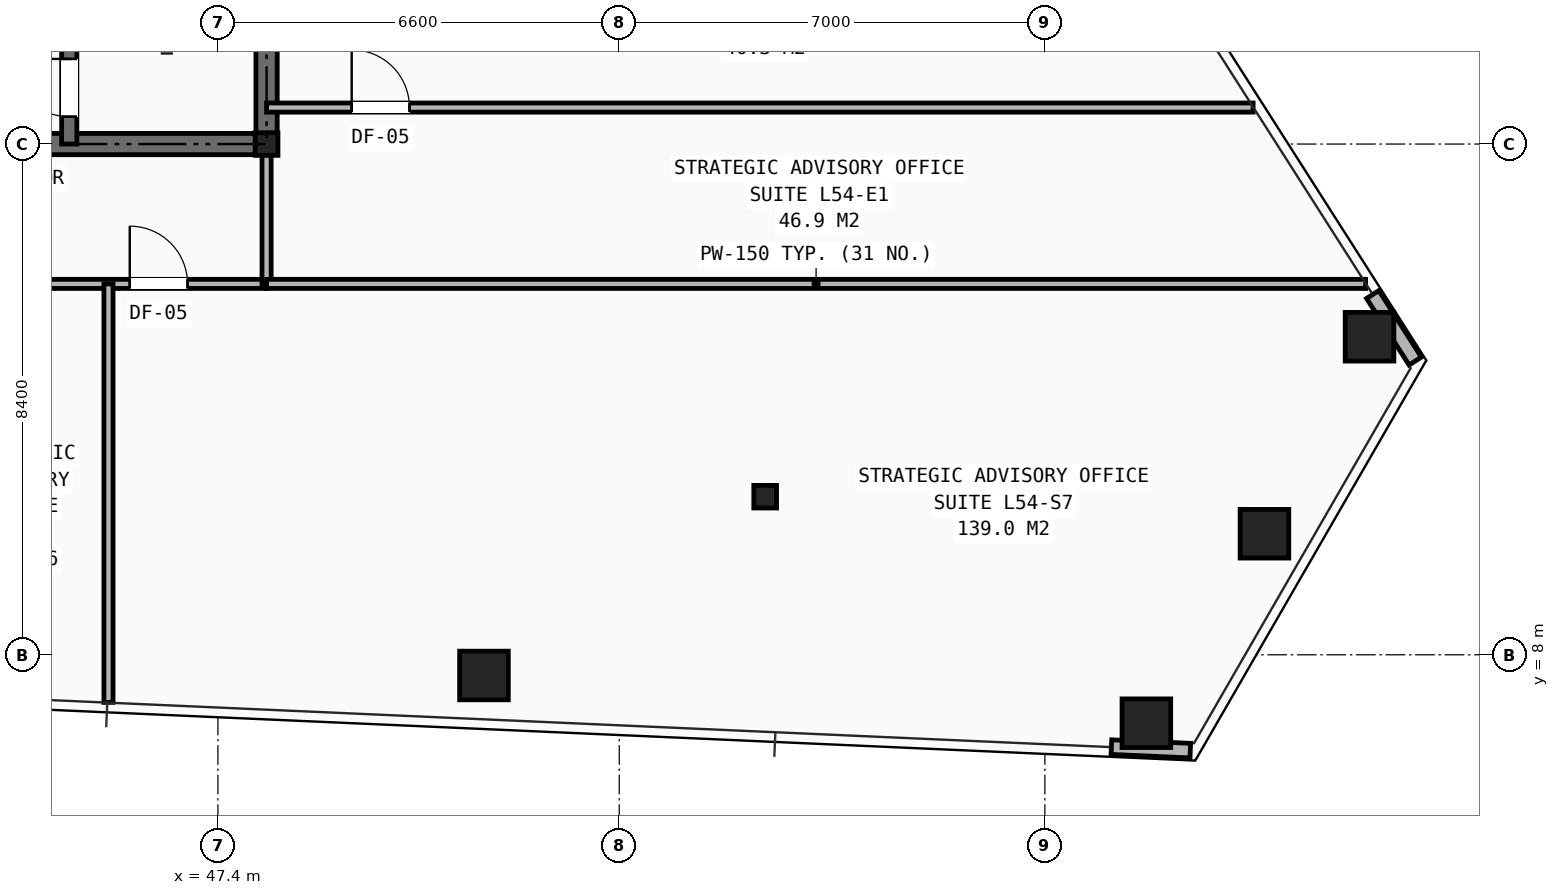
"""IFC4 building model, lengths in metres.
Left out: names, types, materials, properties, quantities, classifications, styles, units other than length and angle.
Written with IfcOpenShell. Run it as: python <this file> out.ifc"""

import sys

from ifc_helpers import new_model, si_unit, direction, frame, frame_2d, origin, origin_2d, place, context, subcontext, project, spatial, rectangle, hollow_rectangle, i_section, extrude, element, fill, save


model = new_model("IFC4")
c1 = context("Model", 3, precision=1e-05, world=origin(), true_north=direction((0.0, 1.0)))
c2 = subcontext(c1, "Body", "Model", "MODEL_VIEW")
j1 = project(units=[si_unit("LENGTHUNIT", "METRE"), si_unit("PLANEANGLEUNIT", "RADIAN")], contexts=[c1])
p1 = place(None, origin())
s1 = spatial("IfcSite", under=j1, at=p1, CompositionType="ELEMENT")
p2 = place(p1, origin())
s2 = spatial("IfcBuilding", under=s1, at=p2, CompositionType="ELEMENT")
p3 = place(p2, frame((0.0, 0.0, 189.6)))
s3 = spatial("IfcBuildingStorey", under=s2, at=p3, CompositionType="ELEMENT", Elevation=189.6)
for number, where, z_axis, x_axis in (
    (1, (48.2, 16.4, 0.0), (0.0, 0.0, 1.0), (1.0, 0.0, 0.0)),
    (2, (56.4, 10.6, 0.0), (0.0, 0.0, 1.0), (1.0, 0.0, 0.0)),
):
    element("IfcColumn", number, at=place(p3, frame(where, z_axis=z_axis, x_axis=x_axis)), inside=s3, PredefinedType="COLUMN", context=c2, shape_type="SweptSolid", body=[
        extrude(i_section(OverallWidth=0.374, OverallDepth=0.372, WebThickness=0.016, FlangeThickness=0.026, at=origin_2d()), origin(), (0.0, 0.0, 1.0), 3.45),
    ])
for number, where, z_axis, x_axis in (
    (3, (51.775, 7.659, 0.0), (0.0, 0.0, 1.0), (1.0, 0.0, 0.0)),
    (4, (62.669, 6.875, 0.0), (0.0, 0.0, 1.0), (1.0, 0.0, 0.0)),
    (5, (64.611, 9.991, 0.0), (0.0, 0.0, 1.0), (1.0, 0.0, 0.0)),
    (6, (66.339, 13.231, 0.0), (0.0, 0.0, 1.0), (1.0, 0.0, 0.0)),
):
    element("IfcColumn", number, at=place(p3, frame(where, z_axis=z_axis, x_axis=x_axis)), inside=s3, PredefinedType="COLUMN", context=c2, shape_type="SweptSolid", body=[
        extrude(hollow_rectangle(XDim=0.8, YDim=0.8, WallThickness=0.055, at=origin_2d()), origin(), (0.0, 0.0, 1.0), 3.45),
    ])
for number, where, z_axis, x_axis in (
    (7, (62.094, 6.481, 0.0), (0.0, 0.0, 1.0), (0.999, -0.044, 0.0)),
    (8, (67.09, 12.831, 0.0), (0.0, 0.0, 1.0), (-0.538, 0.843, 0.0)),
):
    element("IfcWall", number, at=place(p3, frame(where, z_axis=z_axis, x_axis=x_axis)), inside=s3, PredefinedType="SHEAR", context=c2, shape_type="SweptSolid", body=[
        extrude(rectangle(XDim=1.298, YDim=0.24, at=frame_2d((0.649, 0.0))), origin(), (0.0, 0.0, 1.0), 2.583),
    ])
p4 = place(p3, frame((31.8, 16.4, 0.0), z_axis=(0.0, 0.0, 1.0), x_axis=(1.0, 0.0, 0.0)))
e9 = element("IfcWall", 9, at=p4, inside=s3, PredefinedType="SHEAR", context=c2, shape_type="SweptSolid", body=[
    extrude(rectangle(XDim=16.4, YDim=0.35, at=frame_2d((8.2, 0.0))), origin(), (0.0, 0.0, 1.0), 3.21),
])
p5 = place(p4, frame((7.75, 0.0, 0.0)))
e10 = element("IfcOpeningElement", 10, at=p5, cuts=e9, PredefinedType="OPENING", context=c2, shape_type="SweptSolid", body=[
    extrude(rectangle(XDim=0.9, YDim=2.1, at=frame_2d((0.45, 1.05))), frame((0.0, 0.185, 0.0), z_axis=(0.0, -1.0, 0.0), x_axis=(1.0, 0.0, 0.0)), (0.0, 0.0, 1.0), 0.37),
])
p6 = place(p4, frame((4.2, 0.0, 0.0)))
e11 = element("IfcOpeningElement", 11, at=p6, cuts=e9, PredefinedType="OPENING", context=c2, shape_type="SweptSolid", body=[
    extrude(rectangle(XDim=0.95, YDim=2.1, at=frame_2d((0.475, 1.05))), frame((0.0, 0.185, 0.0), z_axis=(0.0, -1.0, 0.0), x_axis=(1.0, 0.0, 0.0)), (0.0, 0.0, 1.0), 0.37),
])
p7 = place(p4, frame((10.6, 0.0, 0.0)))
e12 = element("IfcOpeningElement", 12, at=p7, cuts=e9, PredefinedType="OPENING", context=c2, shape_type="SweptSolid", body=[
    extrude(rectangle(XDim=0.95, YDim=2.1, at=frame_2d((0.475, 1.05))), frame((0.0, 0.185, 0.0), z_axis=(0.0, -1.0, 0.0), x_axis=(1.0, 0.0, 0.0)), (0.0, 0.0, 1.0), 0.37),
])
p8 = place(p3, frame((48.2, 16.4, 0.0), z_axis=(0.0, 0.0, 1.0), x_axis=(0.0, 1.0, 0.0)))
e13 = element("IfcWall", 13, at=p8, inside=s3, PredefinedType="SHEAR", context=c2, shape_type="SweptSolid", body=[
    extrude(rectangle(XDim=14.8, YDim=0.35, at=frame_2d((7.4, 0.0))), origin(), (0.0, 0.0, 1.0), 3.21),
])
p9 = place(p8, frame((11.0, 0.0, 0.0)))
e14 = element("IfcOpeningElement", 14, at=p9, cuts=e13, PredefinedType="OPENING", context=c2, shape_type="SweptSolid", body=[
    extrude(rectangle(XDim=1.1, YDim=2.15, at=frame_2d((0.55, 1.075))), frame((0.0, 0.185, 0.0), z_axis=(0.0, -1.0, 0.0), x_axis=(1.0, 0.0, 0.0)), (0.0, 0.0, 1.0), 0.37),
])
p10 = place(p3, frame((44.955, 16.4, 0.0), z_axis=(0.0, 0.0, 1.0), x_axis=(0.0, 1.0, 0.0)))
e15 = element("IfcWall", 15, at=p10, inside=s3, PredefinedType="SHEAR", context=c2, shape_type="SweptSolid", body=[
    extrude(rectangle(XDim=8.4, YDim=0.25, at=frame_2d((4.2, 0.0))), origin(), (0.0, 0.0, 1.0), 3.21),
])
p11 = place(p10, frame((0.45, 0.0, 0.0)))
e16 = element("IfcOpeningElement", 16, at=p11, cuts=e15, PredefinedType="OPENING", context=c2, shape_type="SweptSolid", body=[
    extrude(rectangle(XDim=0.95, YDim=2.1, at=frame_2d((0.475, 1.05))), frame((0.0, 0.135, 0.0), z_axis=(0.0, -1.0, 0.0), x_axis=(1.0, 0.0, 0.0)), (0.0, 0.0, 1.0), 0.27),
])
p12 = place(p3, frame((29.6, 14.1, 0.0), z_axis=(0.0, 0.0, 1.0), x_axis=(1.0, 0.0, 0.0)))
e17 = element("IfcWall", 17, at=p12, inside=s3, PredefinedType="PARTITIONING", context=c2, shape_type="SweptSolid", body=[
    extrude(rectangle(XDim=18.6, YDim=0.15, at=frame_2d((9.3, 0.0))), origin(), (0.0, 0.0, 1.0), 2.225),
])
p13 = place(p12, frame((0.55, 0.0, 0.0)))
e18 = element("IfcOpeningElement", 18, at=p13, cuts=e17, PredefinedType="OPENING", context=c2, shape_type="SweptSolid", body=[
    extrude(rectangle(XDim=0.95, YDim=2.1, at=frame_2d((0.475, 1.05))), frame((0.0, 0.085, 0.0), z_axis=(0.0, -1.0, 0.0), x_axis=(1.0, 0.0, 0.0)), (0.0, 0.0, 1.0), 0.17),
])
p14 = place(p12, frame((2.35, 0.0, 0.0)))
e19 = element("IfcOpeningElement", 19, at=p14, cuts=e17, PredefinedType="OPENING", context=c2, shape_type="SweptSolid", body=[
    extrude(rectangle(XDim=0.95, YDim=2.1, at=frame_2d((0.475, 1.05))), frame((0.0, 0.085, 0.0), z_axis=(0.0, -1.0, 0.0), x_axis=(1.0, 0.0, 0.0)), (0.0, 0.0, 1.0), 0.17),
])
p15 = place(p12, frame((5.15, 0.0, 0.0)))
e20 = element("IfcOpeningElement", 20, at=p15, cuts=e17, PredefinedType="OPENING", context=c2, shape_type="SweptSolid", body=[
    extrude(rectangle(XDim=0.95, YDim=2.1, at=frame_2d((0.475, 1.05))), frame((0.0, 0.085, 0.0), z_axis=(0.0, -1.0, 0.0), x_axis=(1.0, 0.0, 0.0)), (0.0, 0.0, 1.0), 0.17),
])
p16 = place(p12, frame((7.95, 0.0, 0.0)))
e21 = element("IfcOpeningElement", 21, at=p16, cuts=e17, PredefinedType="OPENING", context=c2, shape_type="SweptSolid", body=[
    extrude(rectangle(XDim=0.95, YDim=2.1, at=frame_2d((0.475, 1.05))), frame((0.0, 0.085, 0.0), z_axis=(0.0, -1.0, 0.0), x_axis=(1.0, 0.0, 0.0)), (0.0, 0.0, 1.0), 0.17),
])
p17 = place(p12, frame((10.75, 0.0, 0.0)))
e22 = element("IfcOpeningElement", 22, at=p17, cuts=e17, PredefinedType="OPENING", context=c2, shape_type="SweptSolid", body=[
    extrude(rectangle(XDim=0.95, YDim=2.1, at=frame_2d((0.475, 1.05))), frame((0.0, 0.085, 0.0), z_axis=(0.0, -1.0, 0.0), x_axis=(1.0, 0.0, 0.0)), (0.0, 0.0, 1.0), 0.17),
])
p18 = place(p12, frame((13.55, 0.0, 0.0)))
e23 = element("IfcOpeningElement", 23, at=p18, cuts=e17, PredefinedType="OPENING", context=c2, shape_type="SweptSolid", body=[
    extrude(rectangle(XDim=0.95, YDim=2.1, at=frame_2d((0.475, 1.05))), frame((0.0, 0.085, 0.0), z_axis=(0.0, -1.0, 0.0), x_axis=(1.0, 0.0, 0.0)), (0.0, 0.0, 1.0), 0.17),
])
p19 = place(p12, frame((16.35, 0.0, 0.0)))
e24 = element("IfcOpeningElement", 24, at=p19, cuts=e17, PredefinedType="OPENING", context=c2, shape_type="SweptSolid", body=[
    extrude(rectangle(XDim=0.95, YDim=2.1, at=frame_2d((0.475, 1.05))), frame((0.0, 0.085, 0.0), z_axis=(0.0, -1.0, 0.0), x_axis=(1.0, 0.0, 0.0)), (0.0, 0.0, 1.0), 0.17),
])
p20 = place(p3, frame((48.2, 14.1, 0.0), z_axis=(0.0, 0.0, 1.0), x_axis=(0.0, 1.0, 0.0)))
e25 = element("IfcWall", 25, at=p20, inside=s3, PredefinedType="PARTITIONING", context=c2, shape_type="SweptSolid", body=[
    extrude(rectangle(XDim=2.3, YDim=0.15, at=frame_2d((1.15, 0.0))), origin(), (0.0, 0.0, 1.0), 2.665),
])
p21 = place(p3, frame((45.6, 7.217, 0.0), z_axis=(0.0, 0.0, 1.0), x_axis=(0.0, 1.0, 0.0)))
e26 = element("IfcWall", 26, at=p21, inside=s3, PredefinedType="PARTITIONING", context=c2, shape_type="SweptSolid", body=[
    extrude(rectangle(XDim=6.883, YDim=0.15, at=frame_2d((3.441, 0.0))), origin(), (0.0, 0.0, 1.0), 2.589),
])
p22 = place(p3, frame((48.2, 14.1, 0.0), z_axis=(0.0, 0.0, 1.0), x_axis=(1.0, 0.0, 0.0)))
e27 = element("IfcWall", 27, at=p22, inside=s3, PredefinedType="PARTITIONING", context=c2, shape_type="SweptSolid", body=[
    extrude(rectangle(XDim=18.074, YDim=0.15, at=frame_2d((9.037, 0.0))), origin(), (0.0, 0.0, 1.0), 2.589),
])
p23 = place(p3, frame((48.2, 17.0, 0.0), z_axis=(0.0, 0.0, 1.0), x_axis=(1.0, 0.0, 0.0)))
e28 = element("IfcWall", 28, at=p23, inside=s3, PredefinedType="PARTITIONING", context=c2, shape_type="SweptSolid", body=[
    extrude(rectangle(XDim=16.224, YDim=0.15, at=frame_2d((8.112, 0.0))), origin(), (0.0, 0.0, 1.0), 2.589),
])
p24 = place(p23, frame((1.4, 0.0, 0.0)))
e29 = element("IfcOpeningElement", 29, at=p24, cuts=e28, PredefinedType="OPENING", context=c2, shape_type="SweptSolid", body=[
    extrude(rectangle(XDim=0.95, YDim=2.1, at=frame_2d((0.475, 1.05))), frame((0.0, 0.085, 0.0), z_axis=(0.0, -1.0, 0.0), x_axis=(1.0, 0.0, 0.0)), (0.0, 0.0, 1.0), 0.17),
])
p25 = place(p11, origin())
e30 = element("IfcDoor", 30, at=p25, inside=s3, OperationType="SINGLE_SWING_RIGHT", PredefinedType="DOOR", context=c2, shape_type="SweptSolid", body=[
    extrude(rectangle(XDim=0.95, YDim=2.1, at=frame_2d((0.475, 1.05))), frame((0.0, 0.025, 0.0), z_axis=(0.0, -1.0, 0.0), x_axis=(1.0, 0.0, 0.0)), (0.0, 0.0, 1.0), 0.05),
])
fill(e16, e30)
p26 = place(p19, origin())
e31 = element("IfcDoor", 31, at=p26, inside=s3, OperationType="SINGLE_SWING_LEFT", PredefinedType="DOOR", context=c2, shape_type="SweptSolid", body=[
    extrude(rectangle(XDim=0.95, YDim=2.1, at=frame_2d((0.475, 1.05))), frame((0.0, 0.025, 0.0), z_axis=(0.0, -1.0, 0.0), x_axis=(1.0, 0.0, 0.0)), (0.0, 0.0, 1.0), 0.05),
])
fill(e24, e31)
p27 = place(p24, origin())
e32 = element("IfcDoor", 32, at=p27, inside=s3, OperationType="SINGLE_SWING_LEFT", PredefinedType="DOOR", context=c2, shape_type="SweptSolid", body=[
    extrude(rectangle(XDim=0.95, YDim=2.1, at=frame_2d((0.475, 1.05))), frame((0.0, 0.025, 0.0), z_axis=(0.0, -1.0, 0.0), x_axis=(1.0, 0.0, 0.0)), (0.0, 0.0, 1.0), 0.05),
])
fill(e29, e32)
save(model, sys.argv[1])
